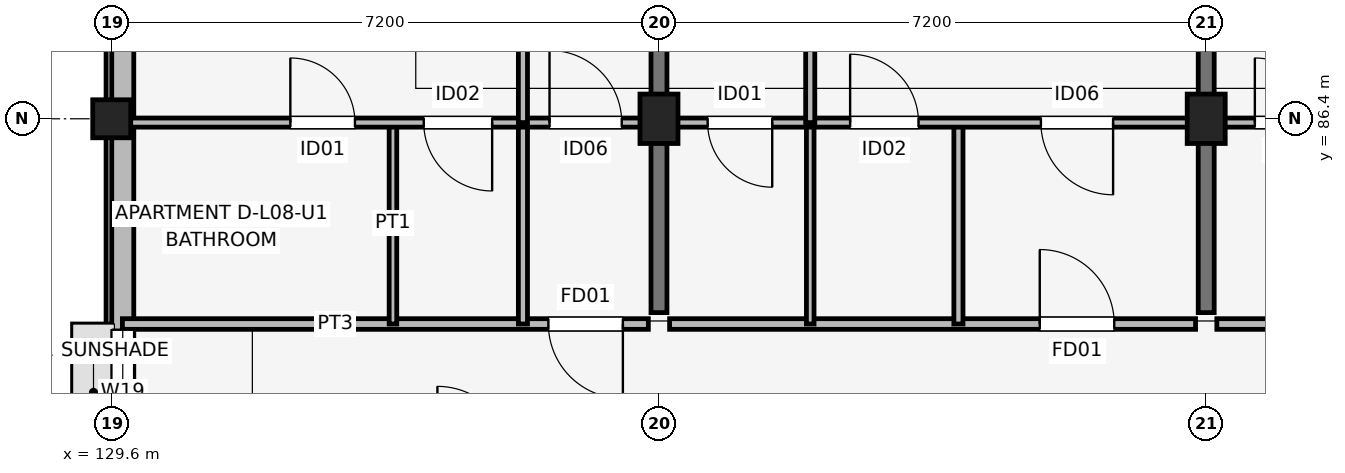
"""IFC4 building model, lengths in metres.
Left out: names, types, materials, properties, quantities, classifications, styles, units other than length and angle.
Written with IfcOpenShell. Run it as: python <this file> out.ifc"""

import sys

from ifc_helpers import new_model, si_unit, direction, frame, frame_2d, origin, origin_2d, place, context, subcontext, project, spatial, rectangle, extrude, element, fill, save


model = new_model("IFC4")
c1 = context("Model", 3, precision=1e-05, world=origin(), true_north=direction((0.0, 1.0)))
c2 = subcontext(c1, "Body", "Model", "MODEL_VIEW")
j1 = project(units=[si_unit("LENGTHUNIT", "METRE"), si_unit("PLANEANGLEUNIT", "RADIAN")], contexts=[c1])
p1 = place(None, origin())
s1 = spatial("IfcSite", under=j1, at=p1, CompositionType="ELEMENT")
p2 = place(p1, origin())
s2 = spatial("IfcBuilding", under=s1, at=p2, CompositionType="ELEMENT")
p3 = place(p2, frame((0.0, 0.0, 27.6)))
s3 = spatial("IfcBuildingStorey", under=s2, at=p3, CompositionType="ELEMENT", Elevation=27.6)
p4 = place(p3, frame((129.6, 86.4, 0.0), z_axis=(0.0, 0.0, 1.0), x_axis=(1.0, 0.0, 0.0)))
e1 = element("IfcColumn", 1, at=p4, inside=s3, PredefinedType="COLUMN", context=c2, shape_type="SweptSolid", body=[
    extrude(rectangle(XDim=0.5, YDim=0.5, at=origin_2d()), origin(), (0.0, 0.0, 1.0), 3.15),
])
for number, where, z_axis, x_axis in (
    (2, (136.8, 86.4, 0.0), (0.0, 0.0, 1.0), (1.0, 0.0, 0.0)),
    (3, (144.0, 86.4, 0.0), (0.0, 0.0, 1.0), (1.0, 0.0, 0.0)),
):
    element("IfcColumn", number, at=place(p3, frame(where, z_axis=z_axis, x_axis=x_axis)), inside=s3, PredefinedType="COLUMN", context=c2, shape_type="SweptSolid", body=[
        extrude(rectangle(XDim=0.5, YDim=0.65, at=origin_2d()), origin(), (0.0, 0.0, 1.0), 3.15),
    ])
for number, where, z_axis, x_axis in (
    (4, (136.8, 83.85, 0.0), (0.0, 0.0, 1.0), (0.0, 1.0, 0.0)),
    (5, (144.0, 83.85, 0.0), (0.0, 0.0, 1.0), (0.0, 1.0, 0.0)),
):
    element("IfcWall", number, at=place(p3, frame(where, z_axis=z_axis, x_axis=x_axis)), inside=s3, PredefinedType="SHEAR", context=c2, shape_type="SweptSolid", body=[
        extrude(rectangle(XDim=9.4, YDim=0.21, at=frame_2d((4.7, 0.0))), origin(), (0.0, 0.0, 1.0), 3.15),
    ])
p5 = place(p3, frame((129.745, 90.8, 0.0), z_axis=(0.0, 0.0, 1.0), x_axis=(0.0, -1.0, 0.0)))
e6 = element("IfcWall", 6, at=p5, inside=s3, PredefinedType="SOLIDWALL", context=c2, shape_type="SweptSolid", body=[
    extrude(rectangle(XDim=16.0, YDim=0.29, at=frame_2d((8.0, 0.0))), origin(), (0.0, 0.0, 1.0), 2.43),
])
p6 = place(p5, frame((7.175, 0.0, 1.05)))
e7 = element("IfcOpeningElement", 7, at=p6, cuts=e6, PredefinedType="OPENING", context=c2, shape_type="SweptSolid", body=[
    extrude(rectangle(XDim=1.65, YDim=1.15, at=frame_2d((0.825, 0.575))), frame((0.0, 0.155, 0.0), z_axis=(0.0, -1.0, 0.0), x_axis=(1.0, 0.0, 0.0)), (0.0, 0.0, 1.0), 0.31),
])
p7 = place(p5, frame((1.45, 0.0, 0.72)))
e8 = element("IfcOpeningElement", 8, at=p7, cuts=e6, PredefinedType="OPENING", context=c2, shape_type="SweptSolid", body=[
    extrude(rectangle(XDim=1.42, YDim=1.6, at=frame_2d((0.71, 0.8))), frame((0.0, 0.155, 0.0), z_axis=(0.0, -1.0, 0.0), x_axis=(1.0, 0.0, 0.0)), (0.0, 0.0, 1.0), 0.31),
])
p8 = place(p3, frame((129.74, 83.7, 0.0), z_axis=(0.0, 0.0, 1.0), x_axis=(1.0, 0.0, 0.0)))
e9 = element("IfcWall", 9, at=p8, inside=s3, PredefinedType="PARTITIONING", context=c2, shape_type="SweptSolid", body=[
    extrude(rectangle(XDim=6.92, YDim=0.14, at=frame_2d((3.46, 0.0))), origin(), (0.0, 0.0, 1.0), 2.38),
])
p9 = place(p8, frame((6.585, 0.0, 0.0), z_axis=(0.0, 0.0, 1.0), x_axis=(-1.0, 0.0, 0.0)))
e10 = element("IfcOpeningElement", 10, at=p9, cuts=e9, PredefinedType="OPENING", context=c2, shape_type="SweptSolid", body=[
    extrude(rectangle(XDim=0.98, YDim=2.1, at=frame_2d((0.49, 1.05))), frame((0.0, 0.08, 0.0), z_axis=(0.0, -1.0, 0.0), x_axis=(1.0, 0.0, 0.0)), (0.0, 0.0, 1.0), 0.16),
])
p10 = place(p3, frame((133.3, 83.7, 0.0), z_axis=(0.0, 0.0, 1.0), x_axis=(0.0, 1.0, 0.0)))
e11 = element("IfcWall", 11, at=p10, inside=s3, PredefinedType="PARTITIONING", context=c2, shape_type="SweptSolid", body=[
    extrude(rectangle(XDim=2.65, YDim=0.1, at=frame_2d((1.325, 0.0))), origin(), (0.0, 0.0, 1.0), 2.38),
])
p11 = place(p3, frame((135.01, 83.7, 0.0), z_axis=(0.0, 0.0, 1.0), x_axis=(0.0, 1.0, 0.0)))
e12 = element("IfcWall", 12, at=p11, inside=s3, PredefinedType="PARTITIONING", context=c2, shape_type="SweptSolid", body=[
    extrude(rectangle(XDim=2.65, YDim=0.12, at=frame_2d((1.325, 0.0))), origin(), (0.0, 0.0, 1.0), 2.38),
])
p12 = place(p3, frame((129.74, 86.35, 0.0), z_axis=(0.0, 0.0, 1.0), x_axis=(1.0, 0.0, 0.0)))
e13 = element("IfcWall", 13, at=p12, inside=s3, PredefinedType="PARTITIONING", context=c2, shape_type="SweptSolid", body=[
    extrude(rectangle(XDim=6.92, YDim=0.12, at=frame_2d((3.46, 0.0))), origin(), (0.0, 0.0, 1.0), 2.38),
])
p13 = place(p12, frame((2.21, 0.0, 0.0)))
e14 = element("IfcOpeningElement", 14, at=p13, cuts=e13, PredefinedType="OPENING", context=c2, shape_type="SweptSolid", body=[
    extrude(rectangle(XDim=0.85, YDim=2.08, at=frame_2d((0.425, 1.04))), frame((0.0, 0.07, 0.0), z_axis=(0.0, -1.0, 0.0), x_axis=(1.0, 0.0, 0.0)), (0.0, 0.0, 1.0), 0.14),
])
p14 = place(p12, frame((4.865, 0.0, 0.0), z_axis=(0.0, 0.0, 1.0), x_axis=(-1.0, 0.0, 0.0)))
e15 = element("IfcOpeningElement", 15, at=p14, cuts=e13, PredefinedType="OPENING", context=c2, shape_type="SweptSolid", body=[
    extrude(rectangle(XDim=0.9, YDim=2.08, at=frame_2d((0.45, 1.04))), frame((0.0, 0.07, 0.0), z_axis=(0.0, -1.0, 0.0), x_axis=(1.0, 0.0, 0.0)), (0.0, 0.0, 1.0), 0.14),
])
p15 = place(p12, frame((5.62, 0.0, 0.0)))
e16 = element("IfcOpeningElement", 16, at=p15, cuts=e13, PredefinedType="OPENING", context=c2, shape_type="SweptSolid", body=[
    extrude(rectangle(XDim=0.95, YDim=2.08, at=frame_2d((0.475, 1.04))), frame((0.0, 0.07, 0.0), z_axis=(0.0, -1.0, 0.0), x_axis=(1.0, 0.0, 0.0)), (0.0, 0.0, 1.0), 0.14),
])
p16 = place(p3, frame((135.01, 86.35, 0.0), z_axis=(0.0, 0.0, 1.0), x_axis=(0.0, 1.0, 0.0)))
e17 = element("IfcWall", 17, at=p16, inside=s3, PredefinedType="PARTITIONING", context=c2, shape_type="SweptSolid", body=[
    extrude(rectangle(XDim=6.95, YDim=0.12, at=frame_2d((3.475, 0.0))), origin(), (0.0, 0.0, 1.0), 2.38),
])
p17 = place(p16, frame((3.925, 0.0, 0.0), z_axis=(0.0, 0.0, 1.0), x_axis=(-1.0, 0.0, 0.0)))
e18 = element("IfcOpeningElement", 18, at=p17, cuts=e17, PredefinedType="OPENING", context=c2, shape_type="SweptSolid", body=[
    extrude(rectangle(XDim=0.9, YDim=2.08, at=frame_2d((0.45, 1.04))), frame((0.0, 0.07, 0.0), z_axis=(0.0, -1.0, 0.0), x_axis=(1.0, 0.0, 0.0)), (0.0, 0.0, 1.0), 0.14),
])
p18 = place(p3, frame((136.94, 83.7, 0.0), z_axis=(0.0, 0.0, 1.0), x_axis=(1.0, 0.0, 0.0)))
e19 = element("IfcWall", 19, at=p18, inside=s3, PredefinedType="PARTITIONING", context=c2, shape_type="SweptSolid", body=[
    extrude(rectangle(XDim=6.92, YDim=0.14, at=frame_2d((3.46, 0.0))), origin(), (0.0, 0.0, 1.0), 2.38),
])
p19 = place(p18, frame((4.87, 0.0, 0.0)))
e20 = element("IfcOpeningElement", 20, at=p19, cuts=e19, PredefinedType="OPENING", context=c2, shape_type="SweptSolid", body=[
    extrude(rectangle(XDim=0.98, YDim=2.1, at=frame_2d((0.49, 1.05))), frame((0.0, 0.08, 0.0), z_axis=(0.0, -1.0, 0.0), x_axis=(1.0, 0.0, 0.0)), (0.0, 0.0, 1.0), 0.16),
])
p20 = place(p3, frame((138.79, 83.7, 0.0), z_axis=(0.0, 0.0, 1.0), x_axis=(0.0, 1.0, 0.0)))
e21 = element("IfcWall", 21, at=p20, inside=s3, PredefinedType="PARTITIONING", context=c2, shape_type="SweptSolid", body=[
    extrude(rectangle(XDim=2.65, YDim=0.1, at=frame_2d((1.325, 0.0))), origin(), (0.0, 0.0, 1.0), 2.38),
])
p21 = place(p3, frame((140.74, 83.7, 0.0), z_axis=(0.0, 0.0, 1.0), x_axis=(0.0, 1.0, 0.0)))
e22 = element("IfcWall", 22, at=p21, inside=s3, PredefinedType="PARTITIONING", context=c2, shape_type="SweptSolid", body=[
    extrude(rectangle(XDim=2.65, YDim=0.12, at=frame_2d((1.325, 0.0))), origin(), (0.0, 0.0, 1.0), 2.38),
])
p22 = place(p3, frame((136.94, 86.35, 0.0), z_axis=(0.0, 0.0, 1.0), x_axis=(1.0, 0.0, 0.0)))
e23 = element("IfcWall", 23, at=p22, inside=s3, PredefinedType="PARTITIONING", context=c2, shape_type="SweptSolid", body=[
    extrude(rectangle(XDim=6.92, YDim=0.12, at=frame_2d((3.46, 0.0))), origin(), (0.0, 0.0, 1.0), 2.38),
])
p23 = place(p22, frame((1.35, 0.0, 0.0), z_axis=(0.0, 0.0, 1.0), x_axis=(-1.0, 0.0, 0.0)))
e24 = element("IfcOpeningElement", 24, at=p23, cuts=e23, PredefinedType="OPENING", context=c2, shape_type="SweptSolid", body=[
    extrude(rectangle(XDim=0.85, YDim=2.08, at=frame_2d((0.425, 1.04))), frame((0.0, 0.07, 0.0), z_axis=(0.0, -1.0, 0.0), x_axis=(1.0, 0.0, 0.0)), (0.0, 0.0, 1.0), 0.14),
])
p24 = place(p22, frame((2.375, 0.0, 0.0)))
e25 = element("IfcOpeningElement", 25, at=p24, cuts=e23, PredefinedType="OPENING", context=c2, shape_type="SweptSolid", body=[
    extrude(rectangle(XDim=0.9, YDim=2.08, at=frame_2d((0.45, 1.04))), frame((0.0, 0.07, 0.0), z_axis=(0.0, -1.0, 0.0), x_axis=(1.0, 0.0, 0.0)), (0.0, 0.0, 1.0), 0.14),
])
p25 = place(p22, frame((5.835, 0.0, 0.0), z_axis=(0.0, 0.0, 1.0), x_axis=(-1.0, 0.0, 0.0)))
e26 = element("IfcOpeningElement", 26, at=p25, cuts=e23, PredefinedType="OPENING", context=c2, shape_type="SweptSolid", body=[
    extrude(rectangle(XDim=0.95, YDim=2.08, at=frame_2d((0.475, 1.04))), frame((0.0, 0.07, 0.0), z_axis=(0.0, -1.0, 0.0), x_axis=(1.0, 0.0, 0.0)), (0.0, 0.0, 1.0), 0.14),
])
p26 = place(p3, frame((138.79, 86.35, 0.0), z_axis=(0.0, 0.0, 1.0), x_axis=(0.0, 1.0, 0.0)))
e27 = element("IfcWall", 27, at=p26, inside=s3, PredefinedType="PARTITIONING", context=c2, shape_type="SweptSolid", body=[
    extrude(rectangle(XDim=6.95, YDim=0.12, at=frame_2d((3.475, 0.0))), origin(), (0.0, 0.0, 1.0), 2.38),
])
p27 = place(p26, frame((3.025, 0.0, 0.0)))
e28 = element("IfcOpeningElement", 28, at=p27, cuts=e27, PredefinedType="OPENING", context=c2, shape_type="SweptSolid", body=[
    extrude(rectangle(XDim=0.9, YDim=2.08, at=frame_2d((0.45, 1.04))), frame((0.0, 0.07, 0.0), z_axis=(0.0, -1.0, 0.0), x_axis=(1.0, 0.0, 0.0)), (0.0, 0.0, 1.0), 0.14),
])
p28 = place(p3, frame((144.14, 83.7, 0.0), z_axis=(0.0, 0.0, 1.0), x_axis=(1.0, 0.0, 0.0)))
e29 = element("IfcWall", 29, at=p28, inside=s3, PredefinedType="PARTITIONING", context=c2, shape_type="SweptSolid", body=[
    extrude(rectangle(XDim=6.92, YDim=0.14, at=frame_2d((3.46, 0.0))), origin(), (0.0, 0.0, 1.0), 2.38),
])
p29 = place(p28, frame((6.0, 0.0, 0.0), z_axis=(0.0, 0.0, 1.0), x_axis=(-1.0, 0.0, 0.0)))
e30 = element("IfcOpeningElement", 30, at=p29, cuts=e29, PredefinedType="OPENING", context=c2, shape_type="SweptSolid", body=[
    extrude(rectangle(XDim=0.98, YDim=2.1, at=frame_2d((0.49, 1.05))), frame((0.0, 0.08, 0.0), z_axis=(0.0, -1.0, 0.0), x_axis=(1.0, 0.0, 0.0)), (0.0, 0.0, 1.0), 0.16),
])
p30 = place(p3, frame((144.14, 86.35, 0.0), z_axis=(0.0, 0.0, 1.0), x_axis=(1.0, 0.0, 0.0)))
e31 = element("IfcWall", 31, at=p30, inside=s3, PredefinedType="PARTITIONING", context=c2, shape_type="SweptSolid", body=[
    extrude(rectangle(XDim=6.92, YDim=0.12, at=frame_2d((3.46, 0.0))), origin(), (0.0, 0.0, 1.0), 2.38),
])
p31 = place(p30, frame((0.5, 0.0, 0.0)))
e32 = element("IfcOpeningElement", 32, at=p31, cuts=e31, PredefinedType="OPENING", context=c2, shape_type="SweptSolid", body=[
    extrude(rectangle(XDim=0.85, YDim=2.08, at=frame_2d((0.425, 1.04))), frame((0.0, 0.07, 0.0), z_axis=(0.0, -1.0, 0.0), x_axis=(1.0, 0.0, 0.0)), (0.0, 0.0, 1.0), 0.14),
])
p32 = place(p30, frame((3.425, 0.0, 0.0), z_axis=(0.0, 0.0, 1.0), x_axis=(-1.0, 0.0, 0.0)))
e33 = element("IfcOpeningElement", 33, at=p32, cuts=e31, PredefinedType="OPENING", context=c2, shape_type="SweptSolid", body=[
    extrude(rectangle(XDim=0.9, YDim=2.08, at=frame_2d((0.45, 1.04))), frame((0.0, 0.07, 0.0), z_axis=(0.0, -1.0, 0.0), x_axis=(1.0, 0.0, 0.0)), (0.0, 0.0, 1.0), 0.14),
])
p33 = place(p30, frame((5.035, 0.0, 0.0)))
e34 = element("IfcOpeningElement", 34, at=p33, cuts=e31, PredefinedType="OPENING", context=c2, shape_type="SweptSolid", body=[
    extrude(rectangle(XDim=0.95, YDim=2.08, at=frame_2d((0.475, 1.04))), frame((0.0, 0.07, 0.0), z_axis=(0.0, -1.0, 0.0), x_axis=(1.0, 0.0, 0.0)), (0.0, 0.0, 1.0), 0.14),
])
p34 = place(p6, origin())
e35 = element("IfcWindow", 35, at=p34, inside=s3, PartitioningType="SINGLE_PANEL", PredefinedType="WINDOW", context=c2, shape_type="SweptSolid", body=[
    extrude(rectangle(XDim=1.65, YDim=1.15, at=frame_2d((0.825, 0.575))), frame((0.0, 0.03, 0.0), z_axis=(0.0, -1.0, 0.0), x_axis=(1.0, 0.0, 0.0)), (0.0, 0.0, 1.0), 0.06),
])
fill(e7, e35)
p35 = place(p9, origin())
e36 = element("IfcDoor", 36, at=p35, inside=s3, OperationType="SINGLE_SWING_RIGHT", PredefinedType="DOOR", context=c2, shape_type="SweptSolid", body=[
    extrude(rectangle(XDim=0.98, YDim=2.1, at=frame_2d((0.49, 1.05))), frame((0.0, 0.025, 0.0), z_axis=(0.0, -1.0, 0.0), x_axis=(1.0, 0.0, 0.0)), (0.0, 0.0, 1.0), 0.05),
])
fill(e10, e36)
p36 = place(p13, origin())
e37 = element("IfcDoor", 37, at=p36, inside=s3, OperationType="SINGLE_SWING_LEFT", PredefinedType="DOOR", context=c2, shape_type="SweptSolid", body=[
    extrude(rectangle(XDim=0.85, YDim=2.08, at=frame_2d((0.425, 1.04))), frame((0.0, 0.025, 0.0), z_axis=(0.0, -1.0, 0.0), x_axis=(1.0, 0.0, 0.0)), (0.0, 0.0, 1.0), 0.05),
])
fill(e14, e37)
p37 = place(p14, origin())
e38 = element("IfcDoor", 38, at=p37, inside=s3, OperationType="SINGLE_SWING_RIGHT", PredefinedType="DOOR", context=c2, shape_type="SweptSolid", body=[
    extrude(rectangle(XDim=0.9, YDim=2.08, at=frame_2d((0.45, 1.04))), frame((0.0, 0.025, 0.0), z_axis=(0.0, -1.0, 0.0), x_axis=(1.0, 0.0, 0.0)), (0.0, 0.0, 1.0), 0.05),
])
fill(e15, e38)
p38 = place(p15, origin())
e39 = element("IfcDoor", 39, at=p38, inside=s3, OperationType="SINGLE_SWING_LEFT", PredefinedType="DOOR", context=c2, shape_type="SweptSolid", body=[
    extrude(rectangle(XDim=0.95, YDim=2.08, at=frame_2d((0.475, 1.04))), frame((0.0, 0.025, 0.0), z_axis=(0.0, -1.0, 0.0), x_axis=(1.0, 0.0, 0.0)), (0.0, 0.0, 1.0), 0.05),
])
fill(e16, e39)
p39 = place(p19, origin())
e40 = element("IfcDoor", 40, at=p39, inside=s3, OperationType="SINGLE_SWING_LEFT", PredefinedType="DOOR", context=c2, shape_type="SweptSolid", body=[
    extrude(rectangle(XDim=0.98, YDim=2.1, at=frame_2d((0.49, 1.05))), frame((0.0, 0.025, 0.0), z_axis=(0.0, -1.0, 0.0), x_axis=(1.0, 0.0, 0.0)), (0.0, 0.0, 1.0), 0.05),
])
fill(e20, e40)
p40 = place(p23, origin())
e41 = element("IfcDoor", 41, at=p40, inside=s3, OperationType="SINGLE_SWING_RIGHT", PredefinedType="DOOR", context=c2, shape_type="SweptSolid", body=[
    extrude(rectangle(XDim=0.85, YDim=2.08, at=frame_2d((0.425, 1.04))), frame((0.0, 0.025, 0.0), z_axis=(0.0, -1.0, 0.0), x_axis=(1.0, 0.0, 0.0)), (0.0, 0.0, 1.0), 0.05),
])
fill(e24, e41)
p41 = place(p24, origin())
e42 = element("IfcDoor", 42, at=p41, inside=s3, OperationType="SINGLE_SWING_LEFT", PredefinedType="DOOR", context=c2, shape_type="SweptSolid", body=[
    extrude(rectangle(XDim=0.9, YDim=2.08, at=frame_2d((0.45, 1.04))), frame((0.0, 0.025, 0.0), z_axis=(0.0, -1.0, 0.0), x_axis=(1.0, 0.0, 0.0)), (0.0, 0.0, 1.0), 0.05),
])
fill(e25, e42)
p42 = place(p25, origin())
e43 = element("IfcDoor", 43, at=p42, inside=s3, OperationType="SINGLE_SWING_RIGHT", PredefinedType="DOOR", context=c2, shape_type="SweptSolid", body=[
    extrude(rectangle(XDim=0.95, YDim=2.08, at=frame_2d((0.475, 1.04))), frame((0.0, 0.025, 0.0), z_axis=(0.0, -1.0, 0.0), x_axis=(1.0, 0.0, 0.0)), (0.0, 0.0, 1.0), 0.05),
])
fill(e26, e43)
p43 = place(p31, origin())
e44 = element("IfcDoor", 44, at=p43, inside=s3, OperationType="SINGLE_SWING_LEFT", PredefinedType="DOOR", context=c2, shape_type="SweptSolid", body=[
    extrude(rectangle(XDim=0.85, YDim=2.08, at=frame_2d((0.425, 1.04))), frame((0.0, 0.025, 0.0), z_axis=(0.0, -1.0, 0.0), x_axis=(1.0, 0.0, 0.0)), (0.0, 0.0, 1.0), 0.05),
])
fill(e32, e44)
save(model, sys.argv[1])
